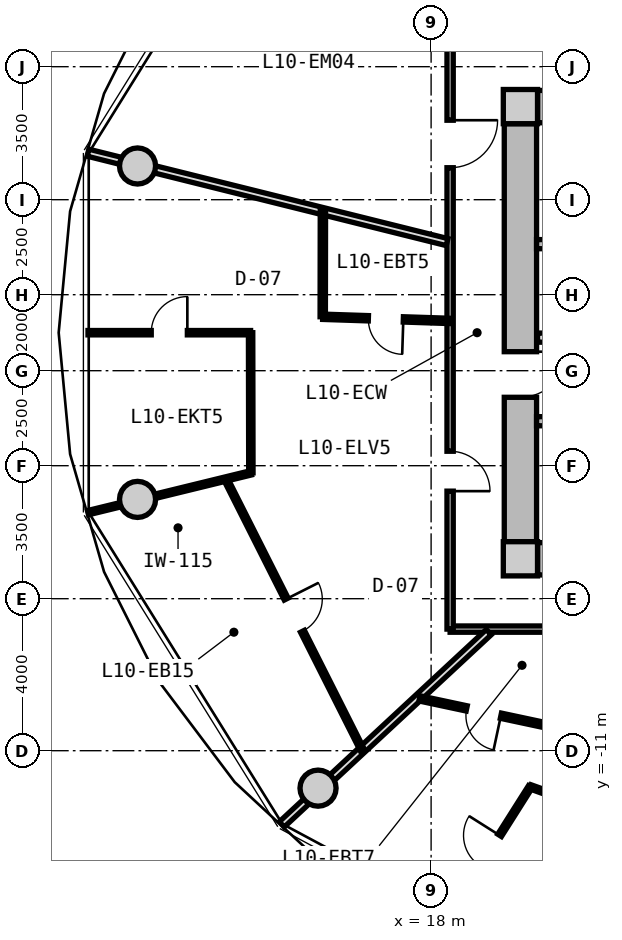
"""IFC4 building model, lengths in metres.
Left out: names, types, materials, properties, quantities, classifications, styles, units other than length and angle.
Written with IfcOpenShell. Run it as: python <this file> out.ifc"""

import sys

from ifc_helpers import new_model, si_unit, direction, frame, frame_2d, origin, origin_2d, place, context, subcontext, project, spatial, rectangle, circle, extrude, source, transform, mapped, element, fill, save


model = new_model("IFC4")
c1 = context("Model", 3, precision=1e-05, world=origin(), true_north=direction((0.0, 1.0)))
c2 = subcontext(c1, "Body", "Model", "MODEL_VIEW")
j1 = project(units=[si_unit("LENGTHUNIT", "METRE"), si_unit("PLANEANGLEUNIT", "RADIAN")], contexts=[c1])
p1 = place(None, origin())
s1 = spatial("IfcSite", under=j1, at=p1, CompositionType="ELEMENT")
p2 = place(p1, origin())
s2 = spatial("IfcBuilding", under=s1, at=p2, CompositionType="ELEMENT")
p3 = place(p2, frame((0.0, 0.0, 36.85)))
s3 = spatial("IfcBuildingStorey", under=s2, at=p3, CompositionType="ELEMENT", Elevation=36.85)
m1 = source(origin(), c2, "Body", "SweptSolid", [
    extrude(rectangle(XDim=0.9, YDim=0.9, at=origin_2d()), origin(), (0.0, 0.0, 1.0), 3.05),
])
for number, where, z_axis, x_axis in (
    (1, (20.35, -5.95, 0.0), (0.0, 0.0, 1.0), (1.0, 0.0, 0.0)),
    (2, (20.35, 5.95, 0.0), (0.0, 0.0, 1.0), (1.0, 0.0, 0.0)),
):
    element("IfcColumn", number, at=place(p3, frame(where, z_axis=z_axis, x_axis=x_axis)), inside=s3, PredefinedType="COLUMN", context=c2, shape_type="MappedRepresentation", body=[
        mapped(m1, transform((0.0, 0.0, 0.0), x_axis=(1.0, 0.0, 0.0), y_axis=(0.0, 1.0, 0.0), z_axis=(0.0, 0.0, 1.0), scale=1.0)),
    ])
m2 = source(origin(), c2, "Body", "SweptSolid", [
    extrude(rectangle(XDim=14.4, YDim=0.85, at=frame_2d((7.2, 0.0))), origin(), (0.0, 0.0, 1.0), 2.79),
])
for number, where, z_axis, x_axis in (
    (3, (20.8, 5.95, 0.0), (0.0, 0.0, 1.0), (1.0, 0.0, 0.0)),
    (4, (35.2, -5.95, 0.0), (0.0, 0.0, 1.0), (-1.0, 0.0, 0.0)),
):
    element("IfcWall", number, at=place(p3, frame(where, z_axis=z_axis, x_axis=x_axis)), inside=s3, PredefinedType="SHEAR", context=c2, shape_type="MappedRepresentation", body=[
        mapped(m2, transform((0.0, 0.0, 0.0), x_axis=(1.0, 0.0, 0.0), y_axis=(0.0, 1.0, 0.0), z_axis=(0.0, 0.0, 1.0), scale=1.0)),
    ])
m3 = source(origin(), c2, "Body", "SweptSolid", [
    extrude(rectangle(XDim=11.0, YDim=0.85, at=frame_2d((5.5, 0.0))), origin(), (0.0, 0.0, 1.0), 2.79),
])
p4 = place(p3, frame((20.35, -5.5, 0.0), z_axis=(0.0, 0.0, 1.0), x_axis=(0.0, 1.0, 0.0)))
e5 = element("IfcWall", 5, at=p4, inside=s3, PredefinedType="SHEAR", context=c2, shape_type="MappedRepresentation", body=[
    mapped(m3, transform((0.0, 0.0, 0.0), x_axis=(1.0, 0.0, 0.0), y_axis=(0.0, 1.0, 0.0), z_axis=(0.0, 0.0, 1.0), scale=1.0)),
])
p5 = place(p4, frame((3.8, 0.0, 0.0)))
e6 = element("IfcOpeningElement", 6, at=p5, cuts=e5, PredefinedType="OPENING", context=c2, shape_type="SweptSolid", body=[
    extrude(rectangle(XDim=1.2, YDim=2.15, at=frame_2d((0.6, 1.075))), frame((0.0, 0.435, 0.0), z_axis=(0.0, -1.0, 0.0), x_axis=(1.0, 0.0, 0.0)), (0.0, 0.0, 1.0), 0.87),
])
m4 = source(origin(), c2, "Body", "SweptSolid", [
    extrude(circle(Radius=0.475, at=origin_2d()), origin(), (0.0, 0.0, 1.0), 3.05),
])
for number, where, z_axis, x_axis in (
    (7, (10.275, 4.387, 0.0), (0.0, 0.0, 1.0), (1.0, 0.0, 0.0)),
    (8, (10.275, -4.387, 0.0), (0.0, 0.0, 1.0), (1.0, 0.0, 0.0)),
    (9, (15.025, -11.985, 0.0), (0.0, 0.0, 1.0), (1.0, 0.0, 0.0)),
):
    element("IfcColumn", number, at=place(p3, frame(where, z_axis=z_axis, x_axis=x_axis)), inside=s3, PredefinedType="COLUMN", context=c2, shape_type="MappedRepresentation", body=[
        mapped(m4, transform((0.0, 0.0, 0.0), x_axis=(1.0, 0.0, 0.0), y_axis=(0.0, 1.0, 0.0), z_axis=(0.0, 0.0, 1.0), scale=1.0)),
    ])
m5 = source(origin(), c2, "Body", "SweptSolid", [
    extrude(rectangle(XDim=7.765, YDim=0.24, at=frame_2d((3.883, 0.0))), origin(), (0.0, 0.0, 1.0), 2.79),
])
p6 = place(p3, frame((20.775, 2.33, 0.0), z_axis=(0.0, 0.0, 1.0), x_axis=(1.0, 0.0, 0.0)))
e10 = element("IfcWall", 10, at=p6, inside=s3, PredefinedType="PARTITIONING", context=c2, shape_type="MappedRepresentation", body=[
    mapped(m5, transform((0.0, 0.0, 0.0), x_axis=(1.0, 0.0, 0.0), y_axis=(0.0, 1.0, 0.0), z_axis=(0.0, 0.0, 1.0), scale=1.0)),
])
p7 = place(p3, frame((20.775, -2.33, 0.0), z_axis=(0.0, 0.0, 1.0), x_axis=(1.0, 0.0, 0.0)))
e11 = element("IfcWall", 11, at=p7, inside=s3, PredefinedType="PARTITIONING", context=c2, shape_type="MappedRepresentation", body=[
    mapped(m5, transform((0.0, 0.0, 0.0), x_axis=(1.0, 0.0, 0.0), y_axis=(0.0, 1.0, 0.0), z_axis=(0.0, 0.0, 1.0), scale=1.0)),
])
p8 = place(p7, frame((0.885, 0.0, 0.0)))
e12 = element("IfcOpeningElement", 12, at=p8, cuts=e11, PredefinedType="OPENING", context=c2, shape_type="SweptSolid", body=[
    extrude(rectangle(XDim=1.1, YDim=2.15, at=frame_2d((0.55, 1.075))), frame((0.0, 0.13, 0.0), z_axis=(0.0, -1.0, 0.0), x_axis=(1.0, 0.0, 0.0)), (0.0, 0.0, 1.0), 0.26),
])
m6 = source(origin(), c2, "Body", "SweptSolid", [
    extrude(rectangle(XDim=7.62, YDim=0.24, at=frame_2d((3.81, 0.0))), origin(), (0.0, 0.0, 1.0), 2.775),
])
p9 = place(p3, frame((20.8, -0.13, 0.0), z_axis=(0.0, 0.0, 1.0), x_axis=(1.0, 0.0, 0.0)))
e13 = element("IfcWall", 13, at=p9, inside=s3, PredefinedType="PARTITIONING", context=c2, shape_type="MappedRepresentation", body=[
    mapped(m6, transform((0.0, 0.0, 0.0), x_axis=(1.0, 0.0, 0.0), y_axis=(0.0, 1.0, 0.0), z_axis=(0.0, 0.0, 1.0), scale=1.0)),
])
p10 = place(p9, frame((6.22, 0.0, 0.0)))
e14 = element("IfcOpeningElement", 14, at=p10, cuts=e13, PredefinedType="OPENING", context=c2, shape_type="SweptSolid", body=[
    extrude(rectangle(XDim=1.0, YDim=2.1, at=frame_2d((0.5, 1.05))), frame((0.0, 0.13, 0.0), z_axis=(0.0, -1.0, 0.0), x_axis=(1.0, 0.0, 0.0)), (0.0, 0.0, 1.0), 0.26),
])
p11 = place(p9, frame((0.85, 0.0, 0.0)))
e15 = element("IfcOpeningElement", 15, at=p11, cuts=e13, PredefinedType="OPENING", context=c2, shape_type="SweptSolid", body=[
    extrude(rectangle(XDim=1.1, YDim=2.2, at=frame_2d((0.55, 1.1))), frame((0.0, 0.13, 0.0), z_axis=(0.0, -1.0, 0.0), x_axis=(1.0, 0.0, 0.0)), (0.0, 0.0, 1.0), 0.26),
])
p12 = place(p9, frame((3.85, 0.0, 0.0)))
e16 = element("IfcOpeningElement", 16, at=p12, cuts=e13, PredefinedType="OPENING", context=c2, shape_type="SweptSolid", body=[
    extrude(rectangle(XDim=1.1, YDim=2.2, at=frame_2d((0.55, 1.1))), frame((0.0, 0.13, 0.0), z_axis=(0.0, -1.0, 0.0), x_axis=(1.0, 0.0, 0.0)), (0.0, 0.0, 1.0), 0.26),
])
m7 = source(origin(), c2, "Body", "SweptSolid", [
    extrude(rectangle(XDim=19.0, YDim=0.165, at=frame_2d((9.5, 0.0))), origin(), (0.0, 0.0, 1.0), 2.775),
])
p13 = place(p3, frame((37.5, -7.8, 0.0), z_axis=(0.0, 0.0, 1.0), x_axis=(-1.0, 0.0, 0.0)))
e17 = element("IfcWall", 17, at=p13, inside=s3, PredefinedType="PARTITIONING", context=c2, shape_type="MappedRepresentation", body=[
    mapped(m7, transform((0.0, 0.0, 0.0), x_axis=(1.0, 0.0, 0.0), y_axis=(0.0, 1.0, 0.0), z_axis=(0.0, 0.0, 1.0), scale=1.0)),
])
p14 = place(p13, frame((7.336, 0.0, 0.0)))
e18 = element("IfcOpeningElement", 18, at=p14, cuts=e17, PredefinedType="OPENING", context=c2, shape_type="SweptSolid", body=[
    extrude(rectangle(XDim=1.05, YDim=2.15, at=frame_2d((0.525, 1.075))), frame((0.0, 0.093, 0.0), z_axis=(0.0, -1.0, 0.0), x_axis=(1.0, 0.0, 0.0)), (0.0, 0.0, 1.0), 0.185),
])
m8 = source(origin(), c2, "Body", "SweptSolid", [
    extrude(rectangle(XDim=15.6, YDim=0.165, at=frame_2d((7.8, 0.0))), origin(), (0.0, 0.0, 1.0), 2.775),
])
p15 = place(p3, frame((18.5, -7.8, 0.0), z_axis=(0.0, 0.0, 1.0), x_axis=(0.0, 1.0, 0.0)))
e19 = element("IfcWall", 19, at=p15, inside=s3, PredefinedType="PARTITIONING", context=c2, shape_type="MappedRepresentation", body=[
    mapped(m8, transform((0.0, 0.0, 0.0), x_axis=(1.0, 0.0, 0.0), y_axis=(0.0, 1.0, 0.0), z_axis=(0.0, 0.0, 1.0), scale=1.0)),
])
p16 = place(p15, frame((12.141, 0.0, 0.0)))
e20 = element("IfcOpeningElement", 20, at=p16, cuts=e19, PredefinedType="OPENING", context=c2, shape_type="SweptSolid", body=[
    extrude(rectangle(XDim=1.25, YDim=2.2, at=frame_2d((0.625, 1.1))), frame((0.0, 0.093, 0.0), z_axis=(0.0, -1.0, 0.0), x_axis=(1.0, 0.0, 0.0)), (0.0, 0.0, 1.0), 0.185),
])
p17 = place(p15, frame((3.63, 0.0, 0.0)))
e21 = element("IfcOpeningElement", 21, at=p17, cuts=e19, PredefinedType="OPENING", context=c2, shape_type="SweptSolid", body=[
    extrude(rectangle(XDim=1.05, YDim=2.15, at=frame_2d((0.525, 1.075))), frame((0.0, 0.093, 0.0), z_axis=(0.0, -1.0, 0.0), x_axis=(1.0, 0.0, 0.0)), (0.0, 0.0, 1.0), 0.185),
])
m9 = source(origin(), c2, "Body", "SweptSolid", [
    extrude(rectangle(XDim=9.737, YDim=0.19, at=frame_2d((4.869, 0.0))), origin(), (0.0, 0.0, 1.0), 2.225),
])
p18 = place(p3, frame((18.42, 2.385, 0.0), z_axis=(0.0, 0.0, 1.0), x_axis=(-0.970392716238, 0.241532557375, 0.0)))
e22 = element("IfcWall", 22, at=p18, inside=s3, PredefinedType="PARTITIONING", context=c2, shape_type="MappedRepresentation", body=[
    mapped(m9, transform((0.0, 0.0, 0.0), x_axis=(1.0, 0.0, 0.0), y_axis=(0.0, 1.0, 0.0), z_axis=(0.0, 0.0, 1.0), scale=1.0)),
])
m10 = source(origin(), c2, "Body", "SweptSolid", [
    extrude(rectangle(XDim=7.435, YDim=0.19, at=frame_2d((3.717, 0.0))), origin(), (0.0, 0.0, 1.0), 2.225),
])
p19 = place(p3, frame((19.517, -7.88, 0.0), z_axis=(0.0, 0.0, 1.0), x_axis=(-0.732651956848, -0.680603489652, 0.0)))
e23 = element("IfcWall", 23, at=p19, inside=s3, PredefinedType="PARTITIONING", context=c2, shape_type="MappedRepresentation", body=[
    mapped(m10, transform((0.0, 0.0, 0.0), x_axis=(1.0, 0.0, 0.0), y_axis=(0.0, 1.0, 0.0), z_axis=(0.0, 0.0, 1.0), scale=1.0)),
])
m11 = source(origin(), c2, "Body", "SweptSolid", [
    extrude(rectangle(XDim=8.018, YDim=0.115, at=frame_2d((4.009, 0.0))), origin(), (0.0, 0.0, 1.0), 2.775),
])
p20 = place(p3, frame((12.596, -3.854, 0.0), z_axis=(0.0, 0.0, 1.0), x_axis=(0.450134355233, -0.89296084026, 0.0)))
e24 = element("IfcWall", 24, at=p20, inside=s3, PredefinedType="PARTITIONING", context=c2, shape_type="MappedRepresentation", body=[
    mapped(m11, transform((0.0, 0.0, 0.0), x_axis=(1.0, 0.0, 0.0), y_axis=(0.0, 1.0, 0.0), z_axis=(0.0, 0.0, 1.0), scale=1.0)),
])
p21 = place(p20, frame((3.534, 0.0, 0.0)))
e25 = element("IfcOpeningElement", 25, at=p21, cuts=e24, PredefinedType="OPENING", context=c2, shape_type="SweptSolid", body=[
    extrude(rectangle(XDim=0.95, YDim=2.1, at=frame_2d((0.475, 1.05))), frame((0.0, 0.067, 0.0), z_axis=(0.0, -1.0, 0.0), x_axis=(1.0, 0.0, 0.0)), (0.0, 0.0, 1.0), 0.135),
])
m12 = source(origin(), c2, "Body", "SweptSolid", [
    extrude(rectangle(XDim=4.414, YDim=0.115, at=frame_2d((2.207, 0.0))), origin(), (0.0, 0.0, 1.0), 2.225),
])
p22 = place(p3, frame((13.259, -3.688, 0.0), z_axis=(0.0, 0.0, 1.0), x_axis=(-0.971401274504, -0.237443812073, 0.0)))
e26 = element("IfcWall", 26, at=p22, inside=s3, PredefinedType="PARTITIONING", context=c2, shape_type="MappedRepresentation", body=[
    mapped(m12, transform((0.0, 0.0, 0.0), x_axis=(1.0, 0.0, 0.0), y_axis=(0.0, 1.0, 0.0), z_axis=(0.0, 0.0, 1.0), scale=1.0)),
])
m13 = source(origin(), c2, "Body", "SweptSolid", [
    extrude(rectangle(XDim=3.323, YDim=0.14, at=frame_2d((1.662, 0.0))), origin(), (0.0, 0.0, 1.0), 2.775),
])
p23 = place(p3, frame((18.47, 0.311, 0.0), z_axis=(0.0, 0.0, 1.0), x_axis=(-0.999467979553, 0.032615300817, 0.0)))
e27 = element("IfcWall", 27, at=p23, inside=s3, PredefinedType="PARTITIONING", context=c2, shape_type="MappedRepresentation", body=[
    mapped(m13, transform((0.0, 0.0, 0.0), x_axis=(1.0, 0.0, 0.0), y_axis=(0.0, 1.0, 0.0), z_axis=(0.0, 0.0, 1.0), scale=1.0)),
])
p24 = place(p23, frame((1.202, 0.0, 0.0)))
e28 = element("IfcOpeningElement", 28, at=p24, cuts=e27, PredefinedType="OPENING", context=c2, shape_type="SweptSolid", body=[
    extrude(rectangle(XDim=0.92, YDim=2.1, at=frame_2d((0.46, 1.05))), frame((0.0, 0.08, 0.0), z_axis=(0.0, -1.0, 0.0), x_axis=(1.0, 0.0, 0.0)), (0.0, 0.0, 1.0), 0.16),
])
m14 = source(origin(), c2, "Body", "SweptSolid", [
    extrude(rectangle(XDim=2.795, YDim=0.14, at=frame_2d((1.397, 0.0))), origin(), (0.0, 0.0, 1.0), 2.775),
])
p25 = place(p3, frame((15.148, 0.419, 0.0), z_axis=(0.0, 0.0, 1.0), x_axis=(0.001659531299, 0.999998622977, 0.0)))
e29 = element("IfcWall", 29, at=p25, inside=s3, PredefinedType="PARTITIONING", context=c2, shape_type="MappedRepresentation", body=[
    mapped(m14, transform((0.0, 0.0, 0.0), x_axis=(1.0, 0.0, 0.0), y_axis=(0.0, 1.0, 0.0), z_axis=(0.0, 0.0, 1.0), scale=1.0)),
])
m15 = source(origin(), c2, "Body", "SweptSolid", [
    extrude(rectangle(XDim=4.279, YDim=0.115, at=frame_2d((2.139, 0.0))), origin(), (0.0, 0.0, 1.0), 2.775),
])
p26 = place(p3, frame((13.25, 0.0, 0.0), z_axis=(0.0, 0.0, 1.0), x_axis=(-1.0, 0.0, 0.0)))
e30 = element("IfcWall", 30, at=p26, inside=s3, PredefinedType="PARTITIONING", context=c2, shape_type="MappedRepresentation", body=[
    mapped(m15, transform((0.0, 0.0, 0.0), x_axis=(1.0, 0.0, 0.0), y_axis=(0.0, 1.0, 0.0), z_axis=(0.0, 0.0, 1.0), scale=1.0)),
])
p27 = place(p26, frame((1.664, 0.0, 0.0)))
e31 = element("IfcOpeningElement", 31, at=p27, cuts=e30, PredefinedType="OPENING", context=c2, shape_type="SweptSolid", body=[
    extrude(rectangle(XDim=0.95, YDim=2.1, at=frame_2d((0.475, 1.05))), frame((0.0, 0.067, 0.0), z_axis=(0.0, -1.0, 0.0), x_axis=(1.0, 0.0, 0.0)), (0.0, 0.0, 1.0), 0.135),
])
m16 = source(origin(), c2, "Body", "SweptSolid", [
    extrude(rectangle(XDim=3.689, YDim=0.115, at=frame_2d((1.844, 0.0))), origin(), (0.0, 0.0, 1.0), 2.775),
])
p28 = place(p3, frame((13.25, 0.0, 0.0), z_axis=(0.0, 0.0, 1.0), x_axis=(0.001919382261, -0.999998157984, 0.0)))
e32 = element("IfcWall", 32, at=p28, inside=s3, PredefinedType="PARTITIONING", context=c2, shape_type="MappedRepresentation", body=[
    mapped(m16, transform((0.0, 0.0, 0.0), x_axis=(1.0, 0.0, 0.0), y_axis=(0.0, 1.0, 0.0), z_axis=(0.0, 0.0, 1.0), scale=1.0)),
])
m17 = source(origin(), c2, "Body", "SweptSolid", [
    extrude(rectangle(XDim=3.459, YDim=0.14, at=frame_2d((1.729, 0.0))), origin(), (0.0, 0.0, 1.0), 2.775),
])
p29 = place(p3, frame((21.078, -10.344, 0.0), z_axis=(0.0, 0.0, 1.0), x_axis=(-0.978006468578, 0.208574560815, 0.0)))
e33 = element("IfcWall", 33, at=p29, inside=s3, PredefinedType="PARTITIONING", context=c2, shape_type="MappedRepresentation", body=[
    mapped(m17, transform((0.0, 0.0, 0.0), x_axis=(1.0, 0.0, 0.0), y_axis=(0.0, 1.0, 0.0), z_axis=(0.0, 0.0, 1.0), scale=1.0)),
])
p30 = place(p29, frame((1.27, 0.0, 0.0)))
e34 = element("IfcOpeningElement", 34, at=p30, cuts=e33, PredefinedType="OPENING", context=c2, shape_type="SweptSolid", body=[
    extrude(rectangle(XDim=0.92, YDim=2.1, at=frame_2d((0.46, 1.05))), frame((0.0, 0.08, 0.0), z_axis=(0.0, -1.0, 0.0), x_axis=(1.0, 0.0, 0.0)), (0.0, 0.0, 1.0), 0.16),
])
m18 = source(origin(), c2, "Body", "SweptSolid", [
    extrude(rectangle(XDim=3.974, YDim=0.115, at=frame_2d((1.987, 0.0))), origin(), (0.0, 0.0, 1.0), 2.775),
])
p31 = place(p3, frame((20.611, -11.95, 0.0), z_axis=(0.0, 0.0, 1.0), x_axis=(-0.534810918023, -0.844971764003, 0.0)))
e35 = element("IfcWall", 35, at=p31, inside=s3, PredefinedType="PARTITIONING", context=c2, shape_type="MappedRepresentation", body=[
    mapped(m18, transform((0.0, 0.0, 0.0), x_axis=(1.0, 0.0, 0.0), y_axis=(0.0, 1.0, 0.0), z_axis=(0.0, 0.0, 1.0), scale=1.0)),
])
p32 = place(p31, frame((1.512, 0.0, 0.0)))
e36 = element("IfcOpeningElement", 36, at=p32, cuts=e35, PredefinedType="OPENING", context=c2, shape_type="SweptSolid", body=[
    extrude(rectangle(XDim=0.95, YDim=2.1, at=frame_2d((0.475, 1.05))), frame((0.0, 0.067, 0.0), z_axis=(0.0, -1.0, 0.0), x_axis=(1.0, 0.0, 0.0)), (0.0, 0.0, 1.0), 0.135),
])
m19 = source(origin(), c2, "Body", "SweptSolid", [
    extrude(rectangle(XDim=3.814, YDim=0.115, at=frame_2d((1.907, 0.0))), origin(), (0.0, 0.0, 1.0), 2.775),
])
p33 = place(p3, frame((20.611, -11.95, 0.0), z_axis=(0.0, 0.0, 1.0), x_axis=(0.940935542004, -0.338585743637, 0.0)))
e37 = element("IfcWall", 37, at=p33, inside=s3, PredefinedType="PARTITIONING", context=c2, shape_type="MappedRepresentation", body=[
    mapped(m19, transform((0.0, 0.0, 0.0), x_axis=(1.0, 0.0, 0.0), y_axis=(0.0, 1.0, 0.0), z_axis=(0.0, 0.0, 1.0), scale=1.0)),
])
m20 = source(origin(), c2, "Body", "SweptSolid", [
    extrude(rectangle(XDim=1.2, YDim=2.15, at=frame_2d((0.6, 1.075))), frame((0.0, 0.025, 0.0), z_axis=(0.0, -1.0, 0.0), x_axis=(1.0, 0.0, 0.0)), (0.0, 0.0, 1.0), 0.05),
])
p34 = place(p5, frame((1.2, 0.0, 0.0), z_axis=(0.0, 0.0, 1.0), x_axis=(-1.0, 0.0, 0.0)))
e38 = element("IfcDoor", 38, at=p34, inside=s3, OperationType="SINGLE_SWING_LEFT", PredefinedType="DOOR", context=c2, shape_type="MappedRepresentation", body=[
    mapped(m20, transform((0.0, 0.0, 0.0), x_axis=(1.0, 0.0, 0.0), y_axis=(0.0, 1.0, 0.0), z_axis=(0.0, 0.0, 1.0), scale=1.0)),
])
fill(e6, e38)
m21 = source(origin(), c2, "Body", "SweptSolid", [
    extrude(rectangle(XDim=1.25, YDim=2.2, at=frame_2d((0.625, 1.1))), frame((0.0, 0.025, 0.0), z_axis=(0.0, -1.0, 0.0), x_axis=(1.0, 0.0, 0.0)), (0.0, 0.0, 1.0), 0.05),
])
p35 = place(p16, frame((1.25, 0.0, 0.0), z_axis=(0.0, 0.0, 1.0), x_axis=(-1.0, 0.0, 0.0)))
e39 = element("IfcDoor", 39, at=p35, inside=s3, OperationType="SINGLE_SWING_LEFT", PredefinedType="DOOR", context=c2, shape_type="MappedRepresentation", body=[
    mapped(m21, transform((0.0, 0.0, 0.0), x_axis=(1.0, 0.0, 0.0), y_axis=(0.0, 1.0, 0.0), z_axis=(0.0, 0.0, 1.0), scale=1.0)),
])
fill(e20, e39)
m22 = source(origin(), c2, "Body", "SweptSolid", [
    extrude(rectangle(XDim=1.05, YDim=2.15, at=frame_2d((0.525, 1.075))), frame((0.0, 0.025, 0.0), z_axis=(0.0, -1.0, 0.0), x_axis=(1.0, 0.0, 0.0)), (0.0, 0.0, 1.0), 0.05),
])
p36 = place(p17, frame((1.05, 0.0, 0.0), z_axis=(0.0, 0.0, 1.0), x_axis=(-1.0, 0.0, 0.0)))
e40 = element("IfcDoor", 40, at=p36, inside=s3, OperationType="SINGLE_SWING_RIGHT", PredefinedType="DOOR", context=c2, shape_type="MappedRepresentation", body=[
    mapped(m22, transform((0.0, 0.0, 0.0), x_axis=(1.0, 0.0, 0.0), y_axis=(0.0, 1.0, 0.0), z_axis=(0.0, 0.0, 1.0), scale=1.0)),
])
fill(e21, e40)
m23 = source(origin(), c2, "Body", "SweptSolid", [
    extrude(rectangle(XDim=0.92, YDim=2.1, at=frame_2d((0.46, 1.05))), frame((0.0, 0.025, 0.0), z_axis=(0.0, -1.0, 0.0), x_axis=(1.0, 0.0, 0.0)), (0.0, 0.0, 1.0), 0.05),
])
p37 = place(p24, origin())
e41 = element("IfcDoor", 41, at=p37, inside=s3, OperationType="SINGLE_SWING_LEFT", PredefinedType="DOOR", context=c2, shape_type="MappedRepresentation", body=[
    mapped(m23, transform((0.0, 0.0, 0.0), x_axis=(1.0, 0.0, 0.0), y_axis=(0.0, 1.0, 0.0), z_axis=(0.0, 0.0, 1.0), scale=1.0)),
])
fill(e28, e41)
m24 = source(origin(), c2, "Body", "SweptSolid", [
    extrude(rectangle(XDim=0.95, YDim=2.1, at=frame_2d((0.475, 1.05))), frame((0.0, 0.025, 0.0), z_axis=(0.0, -1.0, 0.0), x_axis=(1.0, 0.0, 0.0)), (0.0, 0.0, 1.0), 0.05),
])
p38 = place(p27, frame((0.95, 0.0, 0.0), z_axis=(0.0, 0.0, 1.0), x_axis=(-1.0, 0.0, 0.0)))
e42 = element("IfcDoor", 42, at=p38, inside=s3, OperationType="SINGLE_SWING_RIGHT", PredefinedType="DOOR", context=c2, shape_type="MappedRepresentation", body=[
    mapped(m24, transform((0.0, 0.0, 0.0), x_axis=(1.0, 0.0, 0.0), y_axis=(0.0, 1.0, 0.0), z_axis=(0.0, 0.0, 1.0), scale=1.0)),
])
fill(e31, e42)
p39 = place(p21, origin())
e43 = element("IfcDoor", 43, at=p39, inside=s3, OperationType="SINGLE_SWING_LEFT", PredefinedType="DOOR", context=c2, shape_type="MappedRepresentation", body=[
    mapped(m24, transform((0.0, 0.0, 0.0), x_axis=(1.0, 0.0, 0.0), y_axis=(0.0, 1.0, 0.0), z_axis=(0.0, 0.0, 1.0), scale=1.0)),
])
fill(e25, e43)
p40 = place(p30, origin())
e44 = element("IfcDoor", 44, at=p40, inside=s3, OperationType="SINGLE_SWING_LEFT", PredefinedType="DOOR", context=c2, shape_type="MappedRepresentation", body=[
    mapped(m23, transform((0.0, 0.0, 0.0), x_axis=(1.0, 0.0, 0.0), y_axis=(0.0, 1.0, 0.0), z_axis=(0.0, 0.0, 1.0), scale=1.0)),
])
fill(e34, e44)
p41 = place(p32, frame((0.95, 0.0, 0.0), z_axis=(0.0, 0.0, 1.0), x_axis=(-1.0, 0.0, 0.0)))
e45 = element("IfcDoor", 45, at=p41, inside=s3, OperationType="SINGLE_SWING_RIGHT", PredefinedType="DOOR", context=c2, shape_type="MappedRepresentation", body=[
    mapped(m24, transform((0.0, 0.0, 0.0), x_axis=(1.0, 0.0, 0.0), y_axis=(0.0, 1.0, 0.0), z_axis=(0.0, 0.0, 1.0), scale=1.0)),
])
fill(e36, e45)
save(model, sys.argv[1])
